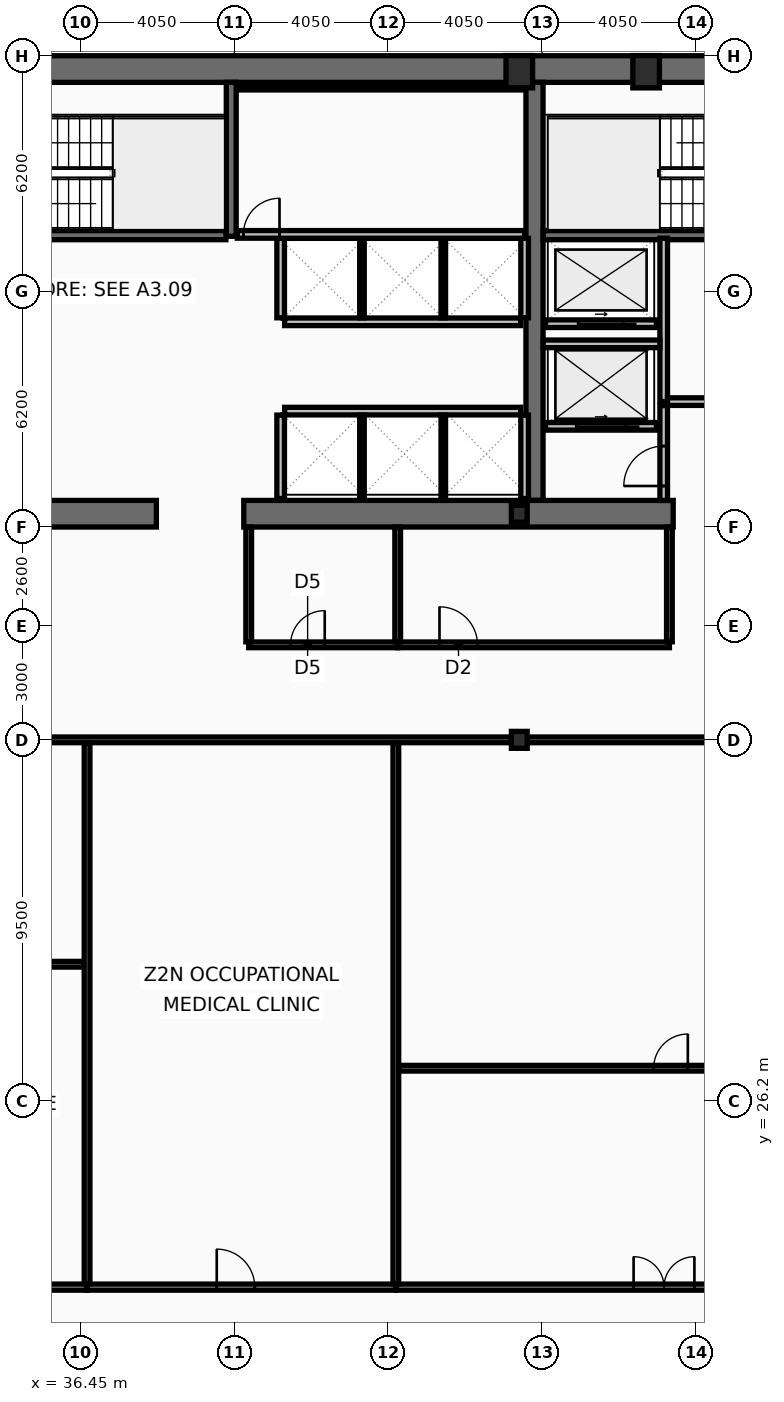
"""IFC4 building model, lengths in metres.
Left out: names, types, materials, properties, quantities, classifications, styles, units other than length and angle.
Written with IfcOpenShell. Run it as: python <this file> out.ifc"""

import sys

from ifc_helpers import new_model, si_unit, direction, frame, frame_2d, origin, origin_2d, place, context, subcontext, project, spatial, rectangle, hollow_rectangle, i_section, extrude, element, fill, save


model = new_model("IFC4")
c1 = context("Model", 3, precision=1e-05, world=origin(), true_north=direction((0.0, 1.0)))
c2 = subcontext(c1, "Body", "Model", "MODEL_VIEW")
j1 = project(units=[si_unit("LENGTHUNIT", "METRE"), si_unit("PLANEANGLEUNIT", "RADIAN")], contexts=[c1])
p1 = place(None, origin())
s1 = spatial("IfcSite", under=j1, at=p1, CompositionType="ELEMENT")
p2 = place(p1, origin())
s2 = spatial("IfcBuilding", under=s1, at=p2, CompositionType="ELEMENT")
p3 = place(p2, frame((0.0, 0.0, 147.0)))
s3 = spatial("IfcBuildingStorey", under=s2, at=p3, CompositionType="ELEMENT", Elevation=147.0)
p4 = place(p3, frame((16.2, 53.35, 0.0), z_axis=(0.0, 0.0, 1.0), x_axis=(1.0, 0.0, 0.0)))
e1 = element("IfcWall", 1, at=p4, inside=s3, PredefinedType="SHEAR", context=c2, shape_type="SweptSolid", body=[
    extrude(rectangle(XDim=40.5, YDim=0.7, at=frame_2d((20.25, 0.0))), origin(), (0.0, 0.0, 1.0), 3.44),
])
p5 = place(p3, frame((48.4, 42.0, 0.0), z_axis=(0.0, 0.0, 1.0), x_axis=(0.0, 1.0, 0.0)))
e2 = element("IfcWall", 2, at=p5, inside=s3, PredefinedType="SHEAR", context=c2, shape_type="SweptSolid", body=[
    extrude(rectangle(XDim=11.0, YDim=0.45, at=frame_2d((5.5, 0.0))), origin(), (0.0, 0.0, 1.0), 3.44),
])
p6 = place(p3, frame((38.45, 41.65, 0.0), z_axis=(0.0, 0.0, 1.0), x_axis=(-1.0, 0.0, 0.0)))
e3 = element("IfcWall", 3, at=p6, inside=s3, PredefinedType="SHEAR", context=c2, shape_type="SweptSolid", body=[
    extrude(rectangle(XDim=3.75, YDim=0.7, at=frame_2d((1.875, 0.0))), origin(), (0.0, 0.0, 1.0), 3.44),
])
p7 = place(p3, frame((52.05, 41.65, 0.0), z_axis=(0.0, 0.0, 1.0), x_axis=(-1.0, 0.0, 0.0)))
e4 = element("IfcWall", 4, at=p7, inside=s3, PredefinedType="SHEAR", context=c2, shape_type="SweptSolid", body=[
    extrude(rectangle(XDim=11.3, YDim=0.7, at=frame_2d((5.65, 0.0))), origin(), (0.0, 0.0, 1.0), 3.44),
])
p8 = place(p3, frame((40.42, 48.95, 0.0), z_axis=(0.0, 0.0, 1.0), x_axis=(0.0, 1.0, 0.0)))
e5 = element("IfcWall", 5, at=p8, inside=s3, PredefinedType="SHEAR", context=c2, shape_type="SweptSolid", body=[
    extrude(rectangle(XDim=4.05, YDim=0.26, at=frame_2d((2.025, 0.0))), origin(), (0.0, 0.0, 1.0), 3.44),
])
p9 = place(p3, frame((48.63, 48.98, 0.0), z_axis=(0.0, 0.0, 1.0), x_axis=(1.0, 0.0, 0.0)))
e6 = element("IfcWall", 6, at=p9, inside=s3, PredefinedType="SHEAR", context=c2, shape_type="SweptSolid", body=[
    extrude(rectangle(XDim=7.37, YDim=0.24, at=frame_2d((3.685, 0.0))), origin(), (0.0, 0.0, 1.0), 3.44),
])
p10 = place(p9, frame((6.1, 0.0, 0.0)))
e7 = element("IfcOpeningElement", 7, at=p10, cuts=e6, PredefinedType="OPENING", context=c2, shape_type="SweptSolid", body=[
    extrude(rectangle(XDim=1.05, YDim=2.15, at=frame_2d((0.525, 1.075))), frame((0.0, 0.13, 0.0), z_axis=(0.0, -1.0, 0.0), x_axis=(1.0, 0.0, 0.0)), (0.0, 0.0, 1.0), 0.26),
])
p11 = place(p3, frame((32.72, 48.98, 0.0), z_axis=(0.0, 0.0, 1.0), x_axis=(1.0, 0.0, 0.0)))
e8 = element("IfcWall", 8, at=p11, inside=s3, PredefinedType="SHEAR", context=c2, shape_type="SweptSolid", body=[
    extrude(rectangle(XDim=7.56, YDim=0.24, at=frame_2d((3.78, 0.0))), origin(), (0.0, 0.0, 1.0), 3.44),
])
p12 = place(p11, frame((0.22, 0.0, 0.0)))
e9 = element("IfcOpeningElement", 9, at=p12, cuts=e8, PredefinedType="OPENING", context=c2, shape_type="SweptSolid", body=[
    extrude(rectangle(XDim=1.05, YDim=2.15, at=frame_2d((0.525, 1.075))), frame((0.0, 0.13, 0.0), z_axis=(0.0, -1.0, 0.0), x_axis=(1.0, 0.0, 0.0)), (0.0, 0.0, 1.0), 0.26),
])
for number, where, z_axis, x_axis in (
    (10, (48.0, 53.28, 0.0), (0.0, 0.0, 1.0), (1.0, 0.0, 0.0)),
    (11, (51.337, 53.28, 0.0), (0.0, 0.0, 1.0), (1.0, 0.0, 0.0)),
):
    element("IfcColumn", number, at=place(p3, frame(where, z_axis=z_axis, x_axis=x_axis)), inside=s3, PredefinedType="COLUMN", context=c2, shape_type="SweptSolid", body=[
        extrude(hollow_rectangle(XDim=0.7, YDim=0.85, WallThickness=0.05, at=origin_2d()), origin(), (0.0, 0.0, 1.0), 3.6),
    ])
for number, where, z_axis, x_axis in (
    (12, (48.0, 35.7, 0.0), (0.0, 0.0, 1.0), (1.0, 0.0, 0.0)),
    (13, (48.0, 41.65, 0.0), (0.0, 0.0, 1.0), (1.0, 0.0, 0.0)),
):
    element("IfcColumn", number, at=place(p3, frame(where, z_axis=z_axis, x_axis=x_axis)), inside=s3, PredefinedType="COLUMN", context=c2, shape_type="SweptSolid", body=[
        extrude(i_section(OverallWidth=0.416, OverallDepth=0.446, WebThickness=0.039, FlangeThickness=0.063, at=origin_2d()), origin(), (0.0, 0.0, 1.0), 3.6),
    ])
p13 = place(p3, frame((51.61, 43.95, 0.0), z_axis=(0.0, 0.0, 1.0), x_axis=(-1.0, 0.0, 0.0)))
e14 = element("IfcWall", 14, at=p13, inside=s3, PredefinedType="PARTITIONING", context=c2, shape_type="SweptSolid", body=[
    extrude(rectangle(XDim=2.92, YDim=0.2, at=frame_2d((1.46, 0.0))), origin(), (0.0, 0.0, 1.0), 3.44),
])
p14 = place(p13, frame((0.81, 0.0, 0.0)))
e15 = element("IfcOpeningElement", 15, at=p14, cuts=e14, PredefinedType="OPENING", context=c2, shape_type="SweptSolid", body=[
    extrude(rectangle(XDim=1.3, YDim=2.18, at=frame_2d((0.65, 1.09))), frame((0.0, 0.11, 0.0), z_axis=(0.0, -1.0, 0.0), x_axis=(1.0, 0.0, 0.0)), (0.0, 0.0, 1.0), 0.22),
])
p15 = place(p3, frame((51.61, 46.65, 0.0), z_axis=(0.0, 0.0, 1.0), x_axis=(-1.0, 0.0, 0.0)))
e16 = element("IfcWall", 16, at=p15, inside=s3, PredefinedType="PARTITIONING", context=c2, shape_type="SweptSolid", body=[
    extrude(rectangle(XDim=2.92, YDim=0.2, at=frame_2d((1.46, 0.0))), origin(), (0.0, 0.0, 1.0), 3.44),
])
p16 = place(p15, frame((0.86, 0.0, 0.0)))
e17 = element("IfcOpeningElement", 17, at=p16, cuts=e16, PredefinedType="OPENING", context=c2, shape_type="SweptSolid", body=[
    extrude(rectangle(XDim=1.2, YDim=2.18, at=frame_2d((0.6, 1.09))), frame((0.0, 0.11, 0.0), z_axis=(0.0, -1.0, 0.0), x_axis=(1.0, 0.0, 0.0)), (0.0, 0.0, 1.0), 0.22),
])
p17 = place(p3, frame((51.8, 44.6, 0.0), z_axis=(0.0, 0.0, 1.0), x_axis=(0.0, 1.0, 0.0)))
e18 = element("IfcWall", 18, at=p17, inside=s3, PredefinedType="PARTITIONING", context=c2, shape_type="SweptSolid", body=[
    extrude(rectangle(XDim=4.3, YDim=0.2, at=frame_2d((2.15, 0.0))), origin(), (0.0, 0.0, 1.0), 3.44),
])
p18 = place(p3, frame((51.9, 44.6, 0.0), z_axis=(0.0, 0.0, 1.0), x_axis=(1.0, 0.0, 0.0)))
e19 = element("IfcWall", 19, at=p18, inside=s3, PredefinedType="PARTITIONING", context=c2, shape_type="SweptSolid", body=[
    extrude(rectangle(XDim=4.1, YDim=0.2, at=frame_2d((2.05, 0.0))), origin(), (0.0, 0.0, 1.0), 3.44),
])
p19 = place(p18, frame((1.15, 0.0, 0.0)))
e20 = element("IfcOpeningElement", 20, at=p19, cuts=e19, PredefinedType="OPENING", context=c2, shape_type="SweptSolid", body=[
    extrude(rectangle(XDim=1.05, YDim=2.15, at=frame_2d((0.525, 1.075))), frame((0.0, 0.11, 0.0), z_axis=(0.0, -1.0, 0.0), x_axis=(1.0, 0.0, 0.0)), (0.0, 0.0, 1.0), 0.22),
])
p20 = place(p3, frame((48.63, 46.12, 0.0), z_axis=(0.0, 0.0, 1.0), x_axis=(1.0, 0.0, 0.0)))
e21 = element("IfcWall", 21, at=p20, inside=s3, PredefinedType="PARTITIONING", context=c2, shape_type="SweptSolid", body=[
    extrude(rectangle(XDim=3.07, YDim=0.2, at=frame_2d((1.535, 0.0))), origin(), (0.0, 0.0, 1.0), 3.44),
])
p21 = place(p3, frame((51.8, 42.0, 0.0), z_axis=(0.0, 0.0, 1.0), x_axis=(0.0, 1.0, 0.0)))
e22 = element("IfcWall", 22, at=p21, inside=s3, PredefinedType="PARTITIONING", context=c2, shape_type="SweptSolid", body=[
    extrude(rectangle(XDim=2.495, YDim=0.2, at=frame_2d((1.248, 0.0))), origin(), (0.0, 0.0, 1.0), 3.44),
])
p22 = place(p21, frame((0.38, 0.0, 0.0)))
e23 = element("IfcOpeningElement", 23, at=p22, cuts=e22, PredefinedType="OPENING", context=c2, shape_type="SweptSolid", body=[
    extrude(rectangle(XDim=1.05, YDim=2.15, at=frame_2d((0.525, 1.075))), frame((0.0, 0.11, 0.0), z_axis=(0.0, -1.0, 0.0), x_axis=(1.0, 0.0, 0.0)), (0.0, 0.0, 1.0), 0.22),
])
p23 = place(p3, frame((41.825, 46.7, 0.0), z_axis=(0.0, 0.0, 1.0), x_axis=(1.0, 0.0, 0.0)))
e24 = element("IfcWall", 24, at=p23, inside=s3, PredefinedType="PARTITIONING", context=c2, shape_type="SweptSolid", body=[
    extrude(rectangle(XDim=6.21, YDim=0.2, at=frame_2d((3.105, 0.0))), origin(), (0.0, 0.0, 1.0), 3.44),
])
for number, where, z_axis, x_axis in (
    (25, (41.72, 46.805, 0.0), (0.0, 0.0, 1.0), (0.0, 1.0, 0.0)),
    (26, (48.14, 46.805, 0.0), (0.0, 0.0, 1.0), (0.0, 1.0, 0.0)),
):
    element("IfcWall", number, at=place(p3, frame(where, z_axis=z_axis, x_axis=x_axis)), inside=s3, PredefinedType="PARTITIONING", context=c2, shape_type="SweptSolid", body=[
        extrude(rectangle(XDim=2.09, YDim=0.2, at=frame_2d((1.045, 0.0))), origin(), (0.0, 0.0, 1.0), 3.44),
    ])
for number, where, z_axis, x_axis in (
    (27, (43.86, 46.805, 0.0), (0.0, 0.0, 1.0), (0.0, 1.0, 0.0)),
    (28, (46.0, 46.805, 0.0), (0.0, 0.0, 1.0), (0.0, 1.0, 0.0)),
):
    element("IfcWall", number, at=place(p3, frame(where, z_axis=z_axis, x_axis=x_axis)), inside=s3, PredefinedType="PARTITIONING", context=c2, shape_type="SweptSolid", body=[
        extrude(rectangle(XDim=2.09, YDim=0.12, at=frame_2d((1.045, 0.0))), origin(), (0.0, 0.0, 1.0), 3.44),
    ])
p24 = place(p3, frame((41.825, 44.35, 0.0), z_axis=(0.0, 0.0, 1.0), x_axis=(1.0, 0.0, 0.0)))
e29 = element("IfcWall", 29, at=p24, inside=s3, PredefinedType="PARTITIONING", context=c2, shape_type="SweptSolid", body=[
    extrude(rectangle(XDim=6.21, YDim=0.2, at=frame_2d((3.105, 0.0))), origin(), (0.0, 0.0, 1.0), 3.44),
])
for number, where, z_axis, x_axis in (
    (30, (41.72, 42.05, 0.0), (0.0, 0.0, 1.0), (0.0, 1.0, 0.0)),
    (31, (48.14, 42.05, 0.0), (0.0, 0.0, 1.0), (0.0, 1.0, 0.0)),
):
    element("IfcWall", number, at=place(p3, frame(where, z_axis=z_axis, x_axis=x_axis)), inside=s3, PredefinedType="PARTITIONING", context=c2, shape_type="SweptSolid", body=[
        extrude(rectangle(XDim=2.195, YDim=0.2, at=frame_2d((1.098, 0.0))), origin(), (0.0, 0.0, 1.0), 3.44),
    ])
for number, where, z_axis, x_axis in (
    (32, (43.86, 42.05, 0.0), (0.0, 0.0, 1.0), (0.0, 1.0, 0.0)),
    (33, (46.0, 42.05, 0.0), (0.0, 0.0, 1.0), (0.0, 1.0, 0.0)),
):
    element("IfcWall", number, at=place(p3, frame(where, z_axis=z_axis, x_axis=x_axis)), inside=s3, PredefinedType="PARTITIONING", context=c2, shape_type="SweptSolid", body=[
        extrude(rectangle(XDim=2.195, YDim=0.12, at=frame_2d((1.098, 0.0))), origin(), (0.0, 0.0, 1.0), 3.44),
    ])
p25 = place(p3, frame((40.58, 52.86, 0.0), z_axis=(0.0, 0.0, 1.0), x_axis=(1.0, 0.0, 0.0)))
e34 = element("IfcWall", 34, at=p25, inside=s3, PredefinedType="PARTITIONING", context=c2, shape_type="SweptSolid", body=[
    extrude(rectangle(XDim=7.56, YDim=0.12, at=frame_2d((3.78, 0.0))), origin(), (0.0, 0.0, 1.0), 3.44),
])
p26 = place(p3, frame((40.58, 49.0, 0.0), z_axis=(0.0, 0.0, 1.0), x_axis=(1.0, 0.0, 0.0)))
e35 = element("IfcWall", 35, at=p26, inside=s3, PredefinedType="PARTITIONING", context=c2, shape_type="SweptSolid", body=[
    extrude(rectangle(XDim=7.56, YDim=0.2, at=frame_2d((3.78, 0.0))), origin(), (0.0, 0.0, 1.0), 3.44),
])
p27 = place(p26, frame((0.16, 0.0, 0.0)))
e36 = element("IfcOpeningElement", 36, at=p27, cuts=e35, PredefinedType="OPENING", context=c2, shape_type="SweptSolid", body=[
    extrude(rectangle(XDim=0.95, YDim=2.1, at=frame_2d((0.475, 1.05))), frame((0.0, 0.11, 0.0), z_axis=(0.0, -1.0, 0.0), x_axis=(1.0, 0.0, 0.0)), (0.0, 0.0, 1.0), 0.22),
])
p28 = place(p3, frame((40.88, 38.2, 0.0), z_axis=(0.0, 0.0, 1.0), x_axis=(1.0, 0.0, 0.0)))
e37 = element("IfcWall", 37, at=p28, inside=s3, PredefinedType="PARTITIONING", context=c2, shape_type="SweptSolid", body=[
    extrude(rectangle(XDim=3.92, YDim=0.15, at=frame_2d((1.96, 0.0))), origin(), (0.0, 0.0, 1.0), 2.73),
])
p29 = place(p28, frame((1.1, 0.0, 0.0)))
e38 = element("IfcOpeningElement", 38, at=p29, cuts=e37, PredefinedType="OPENING", context=c2, shape_type="SweptSolid", body=[
    extrude(rectangle(XDim=0.9, YDim=2.05, at=frame_2d((0.45, 1.025))), frame((0.0, 0.085, 0.0), z_axis=(0.0, -1.0, 0.0), x_axis=(1.0, 0.0, 0.0)), (0.0, 0.0, 1.0), 0.17),
])
p30 = place(p3, frame((44.8, 38.2, 0.0), z_axis=(0.0, 0.0, 1.0), x_axis=(1.0, 0.0, 0.0)))
e39 = element("IfcWall", 39, at=p30, inside=s3, PredefinedType="PARTITIONING", context=c2, shape_type="SweptSolid", body=[
    extrude(rectangle(XDim=7.15, YDim=0.15, at=frame_2d((3.575, 0.0))), origin(), (0.0, 0.0, 1.0), 2.73),
])
p31 = place(p30, frame((1.1, 0.0, 0.0)))
e40 = element("IfcOpeningElement", 40, at=p31, cuts=e39, PredefinedType="OPENING", context=c2, shape_type="SweptSolid", body=[
    extrude(rectangle(XDim=1.0, YDim=2.05, at=frame_2d((0.5, 1.025))), frame((0.0, 0.085, 0.0), z_axis=(0.0, -1.0, 0.0), x_axis=(1.0, 0.0, 0.0)), (0.0, 0.0, 1.0), 0.17),
])
for number, where, z_axis, x_axis in (
    (41, (40.88, 38.28, 0.0), (0.0, 0.0, 1.0), (0.0, 1.0, 0.0)),
    (42, (44.8, 38.28, 0.0), (0.0, 0.0, 1.0), (0.0, 1.0, 0.0)),
    (43, (51.95, 38.28, 0.0), (0.0, 0.0, 1.0), (0.0, 1.0, 0.0)),
):
    element("IfcWall", number, at=place(p3, frame(where, z_axis=z_axis, x_axis=x_axis)), inside=s3, PredefinedType="PARTITIONING", context=c2, shape_type="SweptSolid", body=[
        extrude(rectangle(XDim=3.02, YDim=0.15, at=frame_2d((1.51, 0.0))), origin(), (0.0, 0.0, 1.0), 3.44),
    ])
p32 = place(p3, frame((21.81, 35.7, 0.0), z_axis=(0.0, 0.0, 1.0), x_axis=(1.0, 0.0, 0.0)))
e44 = element("IfcWall", 44, at=p32, inside=s3, PredefinedType="PARTITIONING", context=c2, shape_type="SweptSolid", body=[
    extrude(rectangle(XDim=44.995, YDim=0.15, at=frame_2d((22.498, 0.0))), origin(), (0.0, 0.0, 1.0), 2.73),
])
p33 = place(p3, frame((29.404, 21.3, 0.0), z_axis=(0.0, 0.0, 1.0), x_axis=(1.0, 0.0, 0.0)))
e45 = element("IfcWall", 45, at=p33, inside=s3, PredefinedType="PARTITIONING", context=c2, shape_type="SweptSolid", body=[
    extrude(rectangle(XDim=7.222, YDim=0.16, at=frame_2d((3.611, 0.0))), origin(), (0.0, 0.0, 1.0), 2.73),
])
p34 = place(p33, frame((3.033, 0.0, 0.0)))
e46 = element("IfcOpeningElement", 46, at=p34, cuts=e45, PredefinedType="OPENING", context=c2, shape_type="SweptSolid", body=[
    extrude(rectangle(XDim=1.0, YDim=2.05, at=frame_2d((0.5, 1.025))), frame((0.0, 0.09, 0.0), z_axis=(0.0, -1.0, 0.0), x_axis=(1.0, 0.0, 0.0)), (0.0, 0.0, 1.0), 0.18),
])
p35 = place(p3, frame((29.484, 29.796, 0.0), z_axis=(0.0, 0.0, 1.0), x_axis=(1.0, 0.0, 0.0)))
e47 = element("IfcWall", 47, at=p35, inside=s3, PredefinedType="PARTITIONING", context=c2, shape_type="SweptSolid", body=[
    extrude(rectangle(XDim=7.062, YDim=0.15, at=frame_2d((3.531, 0.0))), origin(), (0.0, 0.0, 1.0), 2.73),
])
p36 = place(p35, frame((3.25, 0.0, 0.0)))
e48 = element("IfcOpeningElement", 48, at=p36, cuts=e47, PredefinedType="OPENING", context=c2, shape_type="SweptSolid", body=[
    extrude(rectangle(XDim=0.9, YDim=2.05, at=frame_2d((0.45, 1.025))), frame((0.0, 0.085, 0.0), z_axis=(0.0, -1.0, 0.0), x_axis=(1.0, 0.0, 0.0)), (0.0, 0.0, 1.0), 0.17),
])
p37 = place(p3, frame((36.626, 21.3, 0.0), z_axis=(0.0, 0.0, 1.0), x_axis=(1.0, 0.0, 0.0)))
e49 = element("IfcWall", 49, at=p37, inside=s3, PredefinedType="PARTITIONING", context=c2, shape_type="SweptSolid", body=[
    extrude(rectangle(XDim=8.125, YDim=0.16, at=frame_2d((4.062, 0.0))), origin(), (0.0, 0.0, 1.0), 2.73),
])
p38 = place(p37, frame((3.413, 0.0, 0.0)))
e50 = element("IfcOpeningElement", 50, at=p38, cuts=e49, PredefinedType="OPENING", context=c2, shape_type="SweptSolid", body=[
    extrude(rectangle(XDim=1.0, YDim=2.05, at=frame_2d((0.5, 1.025))), frame((0.0, 0.09, 0.0), z_axis=(0.0, -1.0, 0.0), x_axis=(1.0, 0.0, 0.0)), (0.0, 0.0, 1.0), 0.18),
])
p39 = place(p3, frame((36.626, 21.385, 0.0), z_axis=(0.0, 0.0, 1.0), x_axis=(0.0, 1.0, 0.0)))
e51 = element("IfcWall", 51, at=p39, inside=s3, PredefinedType="PARTITIONING", context=c2, shape_type="SweptSolid", body=[
    extrude(rectangle(XDim=14.235, YDim=0.15, at=frame_2d((7.118, 0.0))), origin(), (0.0, 0.0, 1.0), 2.93),
])
p40 = place(p3, frame((44.751, 21.3, 0.0), z_axis=(0.0, 0.0, 1.0), x_axis=(1.0, 0.0, 0.0)))
e52 = element("IfcWall", 52, at=p40, inside=s3, PredefinedType="PARTITIONING", context=c2, shape_type="SweptSolid", body=[
    extrude(rectangle(XDim=14.896, YDim=0.16, at=frame_2d((7.448, 0.0))), origin(), (0.0, 0.0, 1.0), 2.73),
])
p41 = place(p40, frame((6.256, 0.0, 0.0)))
e53 = element("IfcOpeningElement", 53, at=p41, cuts=e52, PredefinedType="OPENING", context=c2, shape_type="SweptSolid", body=[
    extrude(rectangle(XDim=1.6, YDim=2.15, at=frame_2d((0.8, 1.075))), frame((0.0, 0.09, 0.0), z_axis=(0.0, -1.0, 0.0), x_axis=(1.0, 0.0, 0.0)), (0.0, 0.0, 1.0), 0.18),
])
p42 = place(p3, frame((44.751, 21.385, 0.0), z_axis=(0.0, 0.0, 1.0), x_axis=(0.0, 1.0, 0.0)))
e54 = element("IfcWall", 54, at=p42, inside=s3, PredefinedType="PARTITIONING", context=c2, shape_type="SweptSolid", body=[
    extrude(rectangle(XDim=14.235, YDim=0.15, at=frame_2d((7.118, 0.0))), origin(), (0.0, 0.0, 1.0), 2.93),
])
p43 = place(p3, frame((44.831, 27.06, 0.0), z_axis=(0.0, 0.0, 1.0), x_axis=(1.0, 0.0, 0.0)))
e55 = element("IfcWall", 55, at=p43, inside=s3, PredefinedType="PARTITIONING", context=c2, shape_type="SweptSolid", body=[
    extrude(rectangle(XDim=14.736, YDim=0.15, at=frame_2d((7.368, 0.0))), origin(), (0.0, 0.0, 1.0), 2.73),
])
p44 = place(p43, frame((6.703, 0.0, 0.0)))
e56 = element("IfcOpeningElement", 56, at=p44, cuts=e55, PredefinedType="OPENING", context=c2, shape_type="SweptSolid", body=[
    extrude(rectangle(XDim=0.9, YDim=2.05, at=frame_2d((0.45, 1.025))), frame((0.0, 0.085, 0.0), z_axis=(0.0, -1.0, 0.0), x_axis=(1.0, 0.0, 0.0)), (0.0, 0.0, 1.0), 0.17),
])
p45 = place(p14, origin())
e57 = element("IfcDoor", 57, at=p45, inside=s3, OperationType="SLIDING_TO_LEFT", PredefinedType="DOOR", context=c2, shape_type="SweptSolid", body=[
    extrude(rectangle(XDim=1.3, YDim=2.18, at=frame_2d((0.65, 1.09))), frame((0.0, 0.025, 0.0), z_axis=(0.0, -1.0, 0.0), x_axis=(1.0, 0.0, 0.0)), (0.0, 0.0, 1.0), 0.05),
])
fill(e15, e57)
p46 = place(p16, origin())
e58 = element("IfcDoor", 58, at=p46, inside=s3, OperationType="SLIDING_TO_LEFT", PredefinedType="DOOR", context=c2, shape_type="SweptSolid", body=[
    extrude(rectangle(XDim=1.2, YDim=2.18, at=frame_2d((0.6, 1.09))), frame((0.0, 0.025, 0.0), z_axis=(0.0, -1.0, 0.0), x_axis=(1.0, 0.0, 0.0)), (0.0, 0.0, 1.0), 0.05),
])
fill(e17, e58)
p47 = place(p22, origin())
e59 = element("IfcDoor", 59, at=p47, inside=s3, OperationType="SINGLE_SWING_LEFT", PredefinedType="DOOR", context=c2, shape_type="SweptSolid", body=[
    extrude(rectangle(XDim=1.05, YDim=2.15, at=frame_2d((0.525, 1.075))), frame((0.0, 0.025, 0.0), z_axis=(0.0, -1.0, 0.0), x_axis=(1.0, 0.0, 0.0)), (0.0, 0.0, 1.0), 0.05),
])
fill(e23, e59)
p48 = place(p27, origin())
e60 = element("IfcDoor", 60, at=p48, inside=s3, OperationType="SINGLE_SWING_RIGHT", PredefinedType="DOOR", context=c2, shape_type="SweptSolid", body=[
    extrude(rectangle(XDim=0.95, YDim=2.1, at=frame_2d((0.475, 1.05))), frame((0.0, 0.025, 0.0), z_axis=(0.0, -1.0, 0.0), x_axis=(1.0, 0.0, 0.0)), (0.0, 0.0, 1.0), 0.05),
])
fill(e36, e60)
p49 = place(p29, origin())
e61 = element("IfcDoor", 61, at=p49, inside=s3, OperationType="SINGLE_SWING_RIGHT", PredefinedType="DOOR", context=c2, shape_type="SweptSolid", body=[
    extrude(rectangle(XDim=0.9, YDim=2.05, at=frame_2d((0.45, 1.025))), frame((0.0, 0.025, 0.0), z_axis=(0.0, -1.0, 0.0), x_axis=(1.0, 0.0, 0.0)), (0.0, 0.0, 1.0), 0.05),
])
fill(e38, e61)
p50 = place(p31, origin())
e62 = element("IfcDoor", 62, at=p50, inside=s3, OperationType="SINGLE_SWING_LEFT", PredefinedType="DOOR", context=c2, shape_type="SweptSolid", body=[
    extrude(rectangle(XDim=1.0, YDim=2.05, at=frame_2d((0.5, 1.025))), frame((0.0, 0.025, 0.0), z_axis=(0.0, -1.0, 0.0), x_axis=(1.0, 0.0, 0.0)), (0.0, 0.0, 1.0), 0.05),
])
fill(e40, e62)
p51 = place(p38, origin())
e63 = element("IfcDoor", 63, at=p51, inside=s3, OperationType="SINGLE_SWING_LEFT", PredefinedType="DOOR", context=c2, shape_type="SweptSolid", body=[
    extrude(rectangle(XDim=1.0, YDim=2.05, at=frame_2d((0.5, 1.025))), frame((0.0, 0.025, 0.0), z_axis=(0.0, -1.0, 0.0), x_axis=(1.0, 0.0, 0.0)), (0.0, 0.0, 1.0), 0.05),
])
fill(e50, e63)
p52 = place(p41, origin())
e64 = element("IfcDoor", 64, at=p52, inside=s3, OperationType="DOUBLE_DOOR_SINGLE_SWING", PredefinedType="DOOR", context=c2, shape_type="SweptSolid", body=[
    extrude(rectangle(XDim=1.6, YDim=2.15, at=frame_2d((0.8, 1.075))), frame((0.0, 0.025, 0.0), z_axis=(0.0, -1.0, 0.0), x_axis=(1.0, 0.0, 0.0)), (0.0, 0.0, 1.0), 0.05),
])
fill(e53, e64)
p53 = place(p44, origin())
e65 = element("IfcDoor", 65, at=p53, inside=s3, OperationType="SINGLE_SWING_RIGHT", PredefinedType="DOOR", context=c2, shape_type="SweptSolid", body=[
    extrude(rectangle(XDim=0.9, YDim=2.05, at=frame_2d((0.45, 1.025))), frame((0.0, 0.025, 0.0), z_axis=(0.0, -1.0, 0.0), x_axis=(1.0, 0.0, 0.0)), (0.0, 0.0, 1.0), 0.05),
])
fill(e56, e65)
save(model, sys.argv[1])
